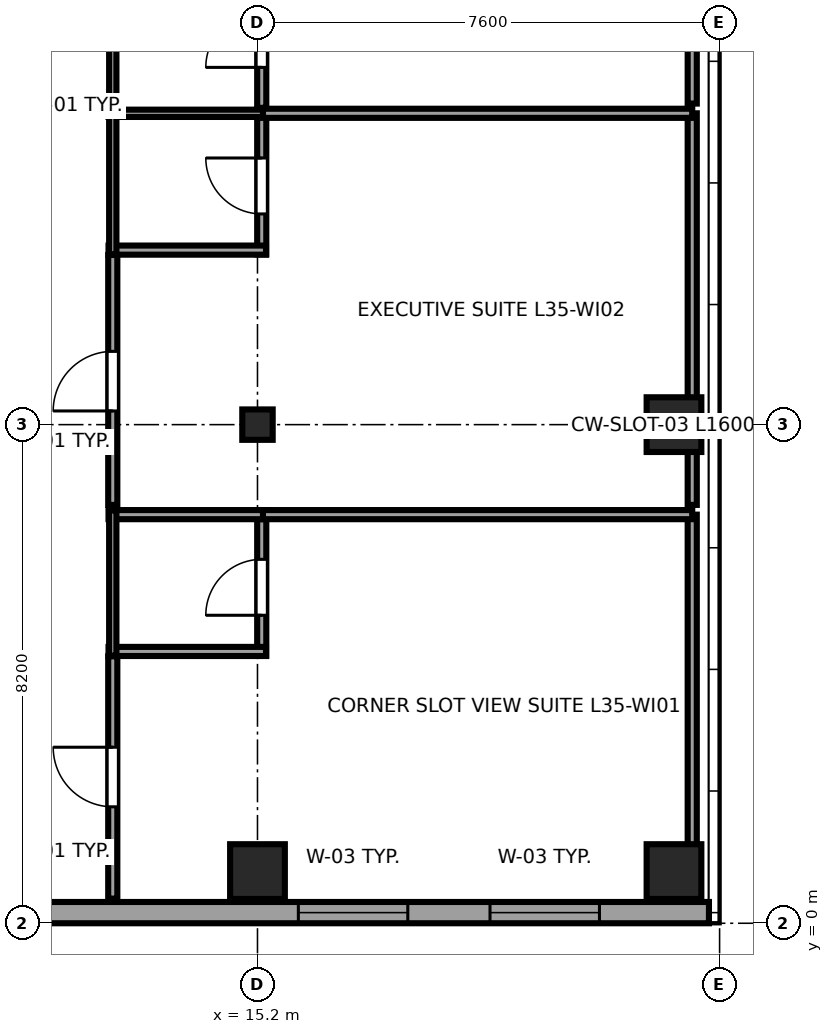
"""IFC4 building model, lengths in metres.
Left out: names, types, materials, properties, quantities, classifications, styles, units other than length and angle.
Written with IfcOpenShell. Run it as: python <this file> out.ifc"""

import sys

from ifc_helpers import new_model, si_unit, direction, frame, frame_2d, origin, origin_2d, place, context, subcontext, project, spatial, rectangle, i_section, extrude, source, transform, mapped, element, fill, save


model = new_model("IFC4")
c1 = context("Model", 3, precision=1e-05, world=origin(), true_north=direction((0.0, 1.0)))
c2 = subcontext(c1, "Body", "Model", "MODEL_VIEW")
j1 = project(units=[si_unit("LENGTHUNIT", "METRE"), si_unit("PLANEANGLEUNIT", "RADIAN")], contexts=[c1])
p1 = place(None, origin())
s1 = spatial("IfcSite", under=j1, at=p1, CompositionType="ELEMENT")
p2 = place(p1, origin())
s2 = spatial("IfcBuilding", under=s1, at=p2, CompositionType="ELEMENT")
p3 = place(p2, frame((0.0, 0.0, 136.4)))
s3 = spatial("IfcBuildingStorey", under=s2, at=p3, CompositionType="ELEMENT", Elevation=136.4)
m1 = source(origin(), c2, "Body", "SweptSolid", [
    extrude(rectangle(XDim=0.9, YDim=0.9, at=origin_2d()), origin(), (0.0, 0.0, 1.0), 3.55),
])
p4 = place(p3, frame((15.2, 0.85, 0.0), z_axis=(0.0, 0.0, 1.0), x_axis=(1.0, 0.0, 0.0)))
e1 = element("IfcColumn", 1, at=p4, inside=s3, PredefinedType="COLUMN", context=c2, shape_type="MappedRepresentation", body=[
    mapped(m1, transform((0.0, 0.0, 0.0), x_axis=(1.0, 0.0, 0.0), y_axis=(0.0, 1.0, 0.0), z_axis=(0.0, 0.0, 1.0), scale=1.0)),
])
m2 = source(origin(), c2, "Body", "SweptSolid", [
    extrude(i_section(OverallWidth=0.5, OverallDepth=0.5, WebThickness=0.022, FlangeThickness=0.034, at=origin_2d()), origin(), (0.0, 0.0, 1.0), 3.55),
])
p5 = place(p3, frame((15.2, 8.2, 0.0), z_axis=(0.0, 0.0, 1.0), x_axis=(1.0, 0.0, 0.0)))
e2 = element("IfcColumn", 2, at=p5, inside=s3, PredefinedType="COLUMN", context=c2, shape_type="MappedRepresentation", body=[
    mapped(m2, transform((0.0, 0.0, 0.0), x_axis=(1.0, 0.0, 0.0), y_axis=(0.0, 1.0, 0.0), z_axis=(0.0, 0.0, 1.0), scale=1.0)),
])
for number, where, z_axis, x_axis in (
    (3, (22.05, 0.85, 0.0), (0.0, 0.0, 1.0), (1.0, 0.0, 0.0)),
    (4, (22.05, 8.2, 0.0), (0.0, 0.0, 1.0), (1.0, 0.0, 0.0)),
):
    element("IfcColumn", number, at=place(p3, frame(where, z_axis=z_axis, x_axis=x_axis)), inside=s3, PredefinedType="COLUMN", context=c2, shape_type="MappedRepresentation", body=[
        mapped(m1, transform((0.0, 0.0, 0.0), x_axis=(1.0, 0.0, 0.0), y_axis=(0.0, 1.0, 0.0), z_axis=(0.0, 0.0, 1.0), scale=1.0)),
    ])
p6 = place(p3, frame((4.617, 0.175, 0.0), z_axis=(0.0, 0.0, 1.0), x_axis=(1.0, 0.0, 0.0)))
e5 = element("IfcWall", 5, at=p6, inside=s3, PredefinedType="SOLIDWALL", context=c2, shape_type="SweptSolid", body=[
    extrude(rectangle(XDim=18.008, YDim=0.35, at=frame_2d((9.004, 0.0))), origin(), (0.0, 0.0, 1.0), 3.37),
])
p7 = place(p6, frame((11.255, 0.0, 0.68)))
e6 = element("IfcOpeningElement", 6, at=p7, cuts=e5, PredefinedType="OPENING", context=c2, shape_type="SweptSolid", body=[
    extrude(rectangle(XDim=1.8, YDim=1.85, at=frame_2d((0.9, 0.925))), frame((0.0, 0.185, 0.0), z_axis=(0.0, -1.0, 0.0), x_axis=(1.0, 0.0, 0.0)), (0.0, 0.0, 1.0), 0.37),
])
p8 = place(p6, frame((14.407, 0.0, 0.68)))
e7 = element("IfcOpeningElement", 7, at=p8, cuts=e5, PredefinedType="OPENING", context=c2, shape_type="SweptSolid", body=[
    extrude(rectangle(XDim=1.8, YDim=1.85, at=frame_2d((0.9, 0.925))), frame((0.0, 0.185, 0.0), z_axis=(0.0, -1.0, 0.0), x_axis=(1.0, 0.0, 0.0)), (0.0, 0.0, 1.0), 0.37),
])
p9 = place(p6, frame((2.391, 0.0, 0.62)))
e8 = element("IfcOpeningElement", 8, at=p9, cuts=e5, PredefinedType="OPENING", context=c2, shape_type="SweptSolid", body=[
    extrude(rectangle(XDim=1.5, YDim=1.55, at=frame_2d((0.75, 0.775))), frame((0.0, 0.185, 0.0), z_axis=(0.0, -1.0, 0.0), x_axis=(1.0, 0.0, 0.0)), (0.0, 0.0, 1.0), 0.37),
])
p10 = place(p3, frame((15.27, 4.4, 0.0), z_axis=(0.0, 0.0, 1.0), x_axis=(0.0, 1.0, 0.0)))
e9 = element("IfcWall", 9, at=p10, inside=s3, PredefinedType="PARTITIONING", context=c2, shape_type="SweptSolid", body=[
    extrude(rectangle(XDim=2.39, YDim=0.15, at=frame_2d((1.195, 0.0))), origin(), (0.0, 0.0, 1.0), 2.827),
])
p11 = place(p10, frame((0.665, 0.0, 0.0)))
e10 = element("IfcOpeningElement", 10, at=p11, cuts=e9, PredefinedType="OPENING", context=c2, shape_type="SweptSolid", body=[
    extrude(rectangle(XDim=0.92, YDim=2.01, at=frame_2d((0.46, 1.005))), frame((0.0, 0.085, 0.0), z_axis=(0.0, -1.0, 0.0), x_axis=(1.0, 0.0, 0.0)), (0.0, 0.0, 1.0), 0.17),
])
for number, where, z_axis, x_axis in (
    (11, (12.75, 4.47, 0.0), (0.0, 0.0, 1.0), (1.0, 0.0, 0.0)),
    (12, (12.75, 6.72, 0.0), (0.0, 0.0, 1.0), (1.0, 0.0, 0.0)),
):
    element("IfcWall", number, at=place(p3, frame(where, z_axis=z_axis, x_axis=x_axis)), inside=s3, PredefinedType="PARTITIONING", context=c2, shape_type="SweptSolid", body=[
        extrude(rectangle(XDim=2.59, YDim=0.15, at=frame_2d((1.295, 0.0))), origin(), (0.0, 0.0, 1.0), 3.37),
    ])
p12 = place(p3, frame((12.82, 4.4, 0.0), z_axis=(0.0, 0.0, 1.0), x_axis=(0.0, 1.0, 0.0)))
e13 = element("IfcWall", 13, at=p12, inside=s3, PredefinedType="PLUMBINGWALL", context=c2, shape_type="SweptSolid", body=[
    extrude(rectangle(XDim=2.39, YDim=0.12, at=frame_2d((1.195, 0.0))), origin(), (0.0, 0.0, 1.0), 3.37),
])
p13 = place(p3, frame((15.27, 11.0, 0.0), z_axis=(0.0, 0.0, 1.0), x_axis=(0.0, 1.0, 0.0)))
e14 = element("IfcWall", 14, at=p13, inside=s3, PredefinedType="PARTITIONING", context=c2, shape_type="SweptSolid", body=[
    extrude(rectangle(XDim=2.39, YDim=0.15, at=frame_2d((1.195, 0.0))), origin(), (0.0, 0.0, 1.0), 2.827),
])
p14 = place(p13, frame((0.665, 0.0, 0.0)))
e15 = element("IfcOpeningElement", 15, at=p14, cuts=e14, PredefinedType="OPENING", context=c2, shape_type="SweptSolid", body=[
    extrude(rectangle(XDim=0.92, YDim=2.01, at=frame_2d((0.46, 1.005))), frame((0.0, 0.085, 0.0), z_axis=(0.0, -1.0, 0.0), x_axis=(1.0, 0.0, 0.0)), (0.0, 0.0, 1.0), 0.17),
])
p15 = place(p3, frame((12.75, 11.07, 0.0), z_axis=(0.0, 0.0, 1.0), x_axis=(1.0, 0.0, 0.0)))
e16 = element("IfcWall", 16, at=p15, inside=s3, PredefinedType="PARTITIONING", context=c2, shape_type="SweptSolid", body=[
    extrude(rectangle(XDim=2.59, YDim=0.15, at=frame_2d((1.295, 0.0))), origin(), (0.0, 0.0, 1.0), 3.37),
])
p16 = place(p3, frame((12.75, 13.32, 0.0), z_axis=(0.0, 0.0, 1.0), x_axis=(1.0, 0.0, 0.0)))
e17 = element("IfcWall", 17, at=p16, inside=s3, PredefinedType="PLUMBINGWALL", context=c2, shape_type="SweptSolid", body=[
    extrude(rectangle(XDim=2.59, YDim=0.12, at=frame_2d((1.295, 0.0))), origin(), (0.0, 0.0, 1.0), 3.37),
])
p17 = place(p3, frame((12.82, 11.0, 0.0), z_axis=(0.0, 0.0, 1.0), x_axis=(0.0, 1.0, 0.0)))
e18 = element("IfcWall", 18, at=p17, inside=s3, PredefinedType="PLUMBINGWALL", context=c2, shape_type="SweptSolid", body=[
    extrude(rectangle(XDim=2.39, YDim=0.12, at=frame_2d((1.195, 0.0))), origin(), (0.0, 0.0, 1.0), 3.37),
])
p18 = place(p3, frame((15.27, 13.41, 0.0), z_axis=(0.0, 0.0, 1.0), x_axis=(0.0, 1.0, 0.0)))
e19 = element("IfcWall", 19, at=p18, inside=s3, PredefinedType="PARTITIONING", context=c2, shape_type="SweptSolid", body=[
    extrude(rectangle(XDim=2.39, YDim=0.15, at=frame_2d((1.195, 0.0))), origin(), (0.0, 0.0, 1.0), 2.827),
])
p19 = place(p18, frame((0.665, 0.0, 0.0)))
e20 = element("IfcOpeningElement", 20, at=p19, cuts=e19, PredefinedType="OPENING", context=c2, shape_type="SweptSolid", body=[
    extrude(rectangle(XDim=0.92, YDim=2.01, at=frame_2d((0.46, 1.005))), frame((0.0, 0.085, 0.0), z_axis=(0.0, -1.0, 0.0), x_axis=(1.0, 0.0, 0.0)), (0.0, 0.0, 1.0), 0.17),
])
p20 = place(p3, frame((12.82, 13.41, 0.0), z_axis=(0.0, 0.0, 1.0), x_axis=(0.0, 1.0, 0.0)))
e21 = element("IfcWall", 21, at=p20, inside=s3, PredefinedType="PLUMBINGWALL", context=c2, shape_type="SweptSolid", body=[
    extrude(rectangle(XDim=2.39, YDim=0.12, at=frame_2d((1.195, 0.0))), origin(), (0.0, 0.0, 1.0), 3.37),
])
p21 = place(p3, frame((12.82, 0.405, 0.0), z_axis=(0.0, 0.0, 1.0), x_axis=(0.0, 1.0, 0.0)))
e22 = element("IfcWall", 22, at=p21, inside=s3, PredefinedType="PARTITIONING", context=c2, shape_type="SweptSolid", body=[
    extrude(rectangle(XDim=3.985, YDim=0.15, at=frame_2d((1.992, 0.0))), origin(), (0.0, 0.0, 1.0), 3.37),
])
p22 = place(p21, frame((1.51, 0.0, 0.0)))
e23 = element("IfcOpeningElement", 23, at=p22, cuts=e22, PredefinedType="OPENING", context=c2, shape_type="SweptSolid", body=[
    extrude(rectangle(XDim=0.98, YDim=2.12, at=frame_2d((0.49, 1.06))), frame((0.0, 0.085, 0.0), z_axis=(0.0, -1.0, 0.0), x_axis=(1.0, 0.0, 0.0)), (0.0, 0.0, 1.0), 0.17),
])
p23 = place(p3, frame((22.35, 0.405, 0.0), z_axis=(0.0, 0.0, 1.0), x_axis=(0.0, 1.0, 0.0)))
e24 = element("IfcWall", 24, at=p23, inside=s3, PredefinedType="PARTITIONING", context=c2, shape_type="SweptSolid", body=[
    extrude(rectangle(XDim=6.315, YDim=0.15, at=frame_2d((3.157, 0.0))), origin(), (0.0, 0.0, 1.0), 3.37),
])
p24 = place(p3, frame((15.29, 6.72, 0.0), z_axis=(0.0, 0.0, 1.0), x_axis=(1.0, 0.0, 0.0)))
e25 = element("IfcWall", 25, at=p24, inside=s3, PredefinedType="PARTITIONING", context=c2, shape_type="SweptSolid", body=[
    extrude(rectangle(XDim=7.06, YDim=0.15, at=frame_2d((3.53, 0.0))), origin(), (0.0, 0.0, 1.0), 3.37),
])
p25 = place(p3, frame((12.82, 6.88, 0.0), z_axis=(0.0, 0.0, 1.0), x_axis=(0.0, 1.0, 0.0)))
e26 = element("IfcWall", 26, at=p25, inside=s3, PredefinedType="PARTITIONING", context=c2, shape_type="SweptSolid", body=[
    extrude(rectangle(XDim=4.11, YDim=0.15, at=frame_2d((2.055, 0.0))), origin(), (0.0, 0.0, 1.0), 3.37),
])
p26 = place(p25, frame((1.545, 0.0, 0.0)))
e27 = element("IfcOpeningElement", 27, at=p26, cuts=e26, PredefinedType="OPENING", context=c2, shape_type="SweptSolid", body=[
    extrude(rectangle(XDim=0.98, YDim=2.12, at=frame_2d((0.49, 1.06))), frame((0.0, 0.085, 0.0), z_axis=(0.0, -1.0, 0.0), x_axis=(1.0, 0.0, 0.0)), (0.0, 0.0, 1.0), 0.17),
])
p27 = place(p3, frame((22.35, 6.88, 0.0), z_axis=(0.0, 0.0, 1.0), x_axis=(0.0, 1.0, 0.0)))
e28 = element("IfcWall", 28, at=p27, inside=s3, PredefinedType="PARTITIONING", context=c2, shape_type="SweptSolid", body=[
    extrude(rectangle(XDim=6.44, YDim=0.15, at=frame_2d((3.22, 0.0))), origin(), (0.0, 0.0, 1.0), 3.37),
])
p28 = place(p3, frame((15.29, 13.32, 0.0), z_axis=(0.0, 0.0, 1.0), x_axis=(1.0, 0.0, 0.0)))
e29 = element("IfcWall", 29, at=p28, inside=s3, PredefinedType="PARTITIONING", context=c2, shape_type="SweptSolid", body=[
    extrude(rectangle(XDim=7.06, YDim=0.15, at=frame_2d((3.53, 0.0))), origin(), (0.0, 0.0, 1.0), 3.37),
])
p29 = place(p3, frame((22.35, 13.48, 0.0), z_axis=(0.0, 0.0, 1.0), x_axis=(0.0, 1.0, 0.0)))
e30 = element("IfcWall", 30, at=p29, inside=s3, PredefinedType="PARTITIONING", context=c2, shape_type="SweptSolid", body=[
    extrude(rectangle(XDim=6.54, YDim=0.15, at=frame_2d((3.27, 0.0))), origin(), (0.0, 0.0, 1.0), 3.37),
])
m3 = source(origin(), c2, "Body", "SweptSolid", [
    extrude(rectangle(XDim=1.8, YDim=1.85, at=frame_2d((0.9, 0.925))), frame((0.0, 0.09, 0.0), z_axis=(0.0, -1.0, 0.0), x_axis=(1.0, 0.0, 0.0)), (0.0, 0.0, 1.0), 0.06),
])
p30 = place(p7, origin())
e31 = element("IfcWindow", 31, at=p30, inside=s3, PartitioningType="TRIPLE_PANEL_HORIZONTAL", PredefinedType="WINDOW", context=c2, shape_type="MappedRepresentation", body=[
    mapped(m3, transform((0.0, 0.0, 0.0), x_axis=(1.0, 0.0, 0.0), y_axis=(0.0, 1.0, 0.0), z_axis=(0.0, 0.0, 1.0), scale=1.0)),
])
fill(e6, e31)
p31 = place(p8, origin())
e32 = element("IfcWindow", 32, at=p31, inside=s3, PartitioningType="TRIPLE_PANEL_HORIZONTAL", PredefinedType="WINDOW", context=c2, shape_type="MappedRepresentation", body=[
    mapped(m3, transform((0.0, 0.0, 0.0), x_axis=(1.0, 0.0, 0.0), y_axis=(0.0, 1.0, 0.0), z_axis=(0.0, 0.0, 1.0), scale=1.0)),
])
fill(e7, e32)
m4 = source(origin(), c2, "Body", "SweptSolid", [
    extrude(rectangle(XDim=0.92, YDim=2.01, at=frame_2d((0.46, 1.005))), frame((0.0, 0.025, 0.0), z_axis=(0.0, -1.0, 0.0), x_axis=(1.0, 0.0, 0.0)), (0.0, 0.0, 1.0), 0.05),
])
p32 = place(p11, origin())
e33 = element("IfcDoor", 33, at=p32, inside=s3, OperationType="SINGLE_SWING_LEFT", PredefinedType="DOOR", context=c2, shape_type="MappedRepresentation", body=[
    mapped(m4, transform((0.0, 0.0, 0.0), x_axis=(1.0, 0.0, 0.0), y_axis=(0.0, 1.0, 0.0), z_axis=(0.0, 0.0, 1.0), scale=1.0)),
])
fill(e10, e33)
p33 = place(p14, origin())
e34 = element("IfcDoor", 34, at=p33, inside=s3, OperationType="SINGLE_SWING_RIGHT", PredefinedType="DOOR", context=c2, shape_type="MappedRepresentation", body=[
    mapped(m4, transform((0.0, 0.0, 0.0), x_axis=(1.0, 0.0, 0.0), y_axis=(0.0, 1.0, 0.0), z_axis=(0.0, 0.0, 1.0), scale=1.0)),
])
fill(e15, e34)
p34 = place(p19, origin())
e35 = element("IfcDoor", 35, at=p34, inside=s3, OperationType="SINGLE_SWING_LEFT", PredefinedType="DOOR", context=c2, shape_type="MappedRepresentation", body=[
    mapped(m4, transform((0.0, 0.0, 0.0), x_axis=(1.0, 0.0, 0.0), y_axis=(0.0, 1.0, 0.0), z_axis=(0.0, 0.0, 1.0), scale=1.0)),
])
fill(e20, e35)
m5 = source(origin(), c2, "Body", "SweptSolid", [
    extrude(rectangle(XDim=0.98, YDim=2.12, at=frame_2d((0.49, 1.06))), frame((0.0, 0.025, 0.0), z_axis=(0.0, -1.0, 0.0), x_axis=(1.0, 0.0, 0.0)), (0.0, 0.0, 1.0), 0.05),
])
p35 = place(p22, origin())
e36 = element("IfcDoor", 36, at=p35, inside=s3, OperationType="SINGLE_SWING_RIGHT", PredefinedType="DOOR", context=c2, shape_type="MappedRepresentation", body=[
    mapped(m5, transform((0.0, 0.0, 0.0), x_axis=(1.0, 0.0, 0.0), y_axis=(0.0, 1.0, 0.0), z_axis=(0.0, 0.0, 1.0), scale=1.0)),
])
fill(e23, e36)
p36 = place(p26, origin())
e37 = element("IfcDoor", 37, at=p36, inside=s3, OperationType="SINGLE_SWING_LEFT", PredefinedType="DOOR", context=c2, shape_type="MappedRepresentation", body=[
    mapped(m5, transform((0.0, 0.0, 0.0), x_axis=(1.0, 0.0, 0.0), y_axis=(0.0, 1.0, 0.0), z_axis=(0.0, 0.0, 1.0), scale=1.0)),
])
fill(e27, e37)
save(model, sys.argv[1])
